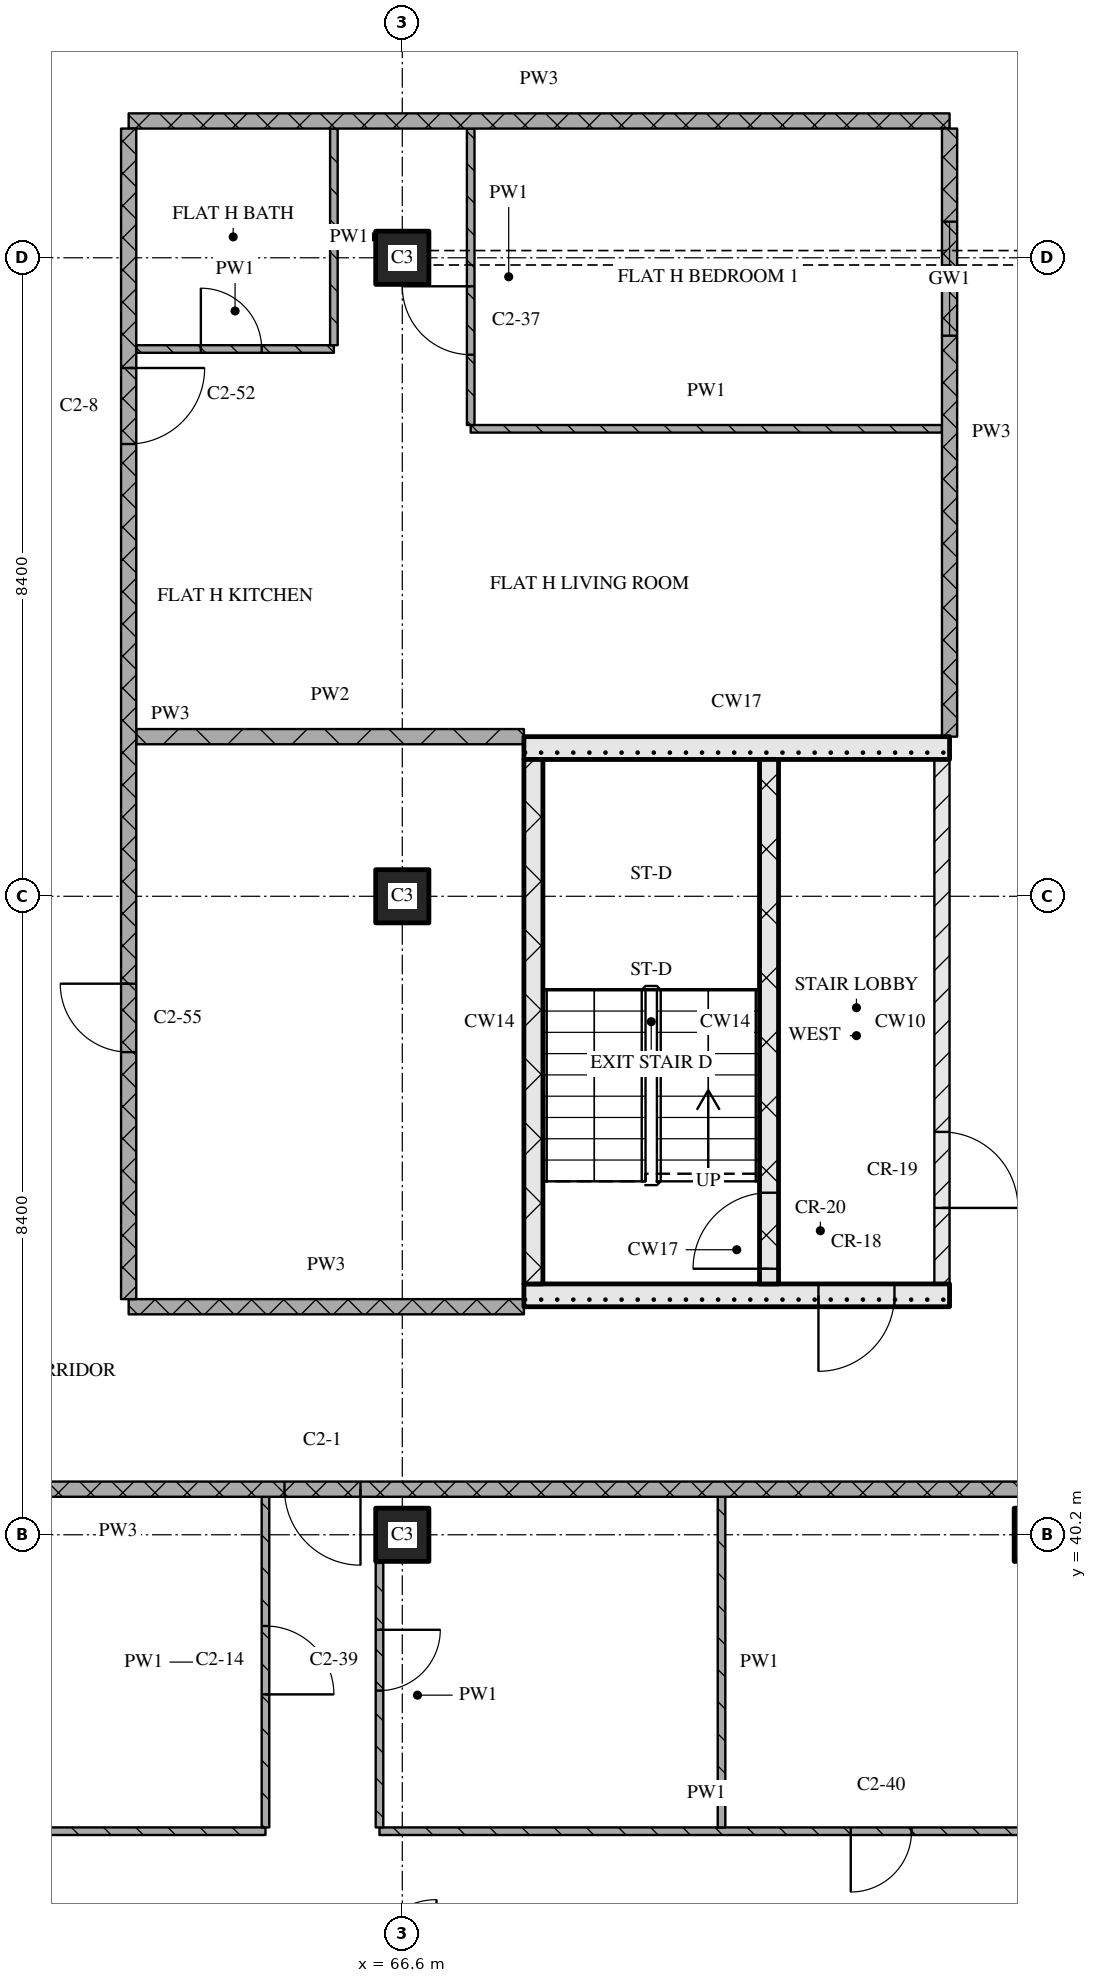
"""IFC4 building model, lengths in metres.
Left out: names, types, materials, properties, quantities, classifications, styles, units other than length and angle.
Written with IfcOpenShell. Run it as: python <this file> out.ifc"""

import sys

from ifc_helpers import new_model, si_unit, direction, frame, frame_2d, origin, origin_2d, place, context, subcontext, project, spatial, rectangle, extrude, element, fill, save


model = new_model("IFC4")
c1 = context("Model", 3, precision=1e-05, world=origin(), true_north=direction((0.0, 1.0)))
c2 = subcontext(c1, "Body", "Model", "MODEL_VIEW")
j1 = project(units=[si_unit("LENGTHUNIT", "METRE"), si_unit("PLANEANGLEUNIT", "RADIAN")], contexts=[c1])
p1 = place(None, origin())
s1 = spatial("IfcSite", under=j1, at=p1, CompositionType="ELEMENT")
p2 = place(p1, origin())
s2 = spatial("IfcBuilding", under=s1, at=p2, CompositionType="ELEMENT")
p3 = place(p2, frame((0.0, 0.0, 161.85)))
s3 = spatial("IfcBuildingStorey", under=s2, at=p3, CompositionType="ELEMENT", Elevation=161.85)
for number, where, z_axis, x_axis in (
    (1, (66.6, 40.2, 0.0), (0.0, 0.0, 1.0), (1.0, 0.0, 0.0)),
    (2, (66.6, 48.6, 0.0), (0.0, 0.0, 1.0), (1.0, 0.0, 0.0)),
    (3, (66.6, 57.0, 0.0), (0.0, 0.0, 1.0), (1.0, 0.0, 0.0)),
    (4, (75.0, 40.2, 0.0), (0.0, 0.0, 1.0), (1.0, 0.0, 0.0)),
):
    element("IfcColumn", number, at=place(p3, frame(where, z_axis=z_axis, x_axis=x_axis)), inside=s3, PredefinedType="COLUMN", context=c2, shape_type="SweptSolid", body=[
        extrude(rectangle(XDim=0.7, YDim=0.7, at=origin_2d()), origin(), (0.0, 0.0, 1.0), 3.6),
    ])
p4 = place(p3, frame((68.2, 43.35, 0.0), z_axis=(0.0, 0.0, 1.0), x_axis=(1.0, 0.0, 0.0)))
e5 = element("IfcWall", 5, at=p4, inside=s3, PredefinedType="SOLIDWALL", context=c2, shape_type="SweptSolid", body=[
    extrude(rectangle(XDim=5.6, YDim=0.3, at=frame_2d((2.8, 0.0))), origin(), (0.0, 0.0, 1.0), 3.32),
])
p5 = place(p4, frame((3.875, 0.0, 0.0)))
e6 = element("IfcOpeningElement", 6, at=p5, cuts=e5, PredefinedType="OPENING", context=c2, shape_type="SweptSolid", body=[
    extrude(rectangle(XDim=1.0, YDim=2.1, at=frame_2d((0.5, 1.05))), frame((0.0, 0.16, 0.0), z_axis=(0.0, -1.0, 0.0), x_axis=(1.0, 0.0, 0.0)), (0.0, 0.0, 1.0), 0.32),
])
p6 = place(p3, frame((68.325, 43.5, 0.0), z_axis=(0.0, 0.0, 1.0), x_axis=(0.0, 1.0, 0.0)))
e7 = element("IfcWall", 7, at=p6, inside=s3, PredefinedType="SOLIDWALL", context=c2, shape_type="SweptSolid", body=[
    extrude(rectangle(XDim=6.9, YDim=0.25, at=frame_2d((3.45, 0.0))), origin(), (0.0, 0.0, 1.0), 3.32),
])
p7 = place(p3, frame((71.425, 43.5, 0.0), z_axis=(0.0, 0.0, 1.0), x_axis=(0.0, 1.0, 0.0)))
e8 = element("IfcWall", 8, at=p7, inside=s3, PredefinedType="SOLIDWALL", context=c2, shape_type="SweptSolid", body=[
    extrude(rectangle(XDim=6.9, YDim=0.25, at=frame_2d((3.45, 0.0))), origin(), (0.0, 0.0, 1.0), 3.32),
])
p8 = place(p7, frame((0.2, 0.0, 0.0)))
e9 = element("IfcOpeningElement", 9, at=p8, cuts=e8, PredefinedType="OPENING", context=c2, shape_type="SweptSolid", body=[
    extrude(rectangle(XDim=1.0, YDim=2.1, at=frame_2d((0.5, 1.05))), frame((0.0, 0.135, 0.0), z_axis=(0.0, -1.0, 0.0), x_axis=(1.0, 0.0, 0.0)), (0.0, 0.0, 1.0), 0.27),
])
p9 = place(p3, frame((73.7, 43.5, 0.0), z_axis=(0.0, 0.0, 1.0), x_axis=(0.0, 1.0, 0.0)))
e10 = element("IfcWall", 10, at=p9, inside=s3, PredefinedType="PARTITIONING", context=c2, shape_type="SweptSolid", body=[
    extrude(rectangle(XDim=6.9, YDim=0.2, at=frame_2d((3.45, 0.0))), origin(), (0.0, 0.0, 1.0), 3.32),
])
p10 = place(p9, frame((1.0, 0.0, 0.0)))
e11 = element("IfcOpeningElement", 11, at=p10, cuts=e10, PredefinedType="OPENING", context=c2, shape_type="SweptSolid", body=[
    extrude(rectangle(XDim=1.0, YDim=2.1, at=frame_2d((0.5, 1.05))), frame((0.0, 0.11, 0.0), z_axis=(0.0, -1.0, 0.0), x_axis=(1.0, 0.0, 0.0)), (0.0, 0.0, 1.0), 0.22),
])
p11 = place(p3, frame((68.2, 50.55, 0.0), z_axis=(0.0, 0.0, 1.0), x_axis=(1.0, 0.0, 0.0)))
e12 = element("IfcWall", 12, at=p11, inside=s3, PredefinedType="SOLIDWALL", context=c2, shape_type="SweptSolid", body=[
    extrude(rectangle(XDim=5.6, YDim=0.3, at=frame_2d((2.8, 0.0))), origin(), (0.0, 0.0, 1.0), 3.32),
])
p12 = place(p3, frame((55.5, 36.3, 0.0), z_axis=(0.0, 0.0, 1.0), x_axis=(1.0, 0.0, 0.0)))
e13 = element("IfcWall", 13, at=p12, inside=s3, PredefinedType="PARTITIONING", context=c2, shape_type="SweptSolid", body=[
    extrude(rectangle(XDim=9.3, YDim=0.1, at=frame_2d((4.65, 0.0))), origin(), (0.0, 0.0, 1.0), 3.32),
])
p13 = place(p3, frame((66.3, 36.3, 0.0), z_axis=(0.0, 0.0, 1.0), x_axis=(1.0, 0.0, 0.0)))
e14 = element("IfcWall", 14, at=p13, inside=s3, PredefinedType="PARTITIONING", context=c2, shape_type="SweptSolid", body=[
    extrude(rectangle(XDim=8.6, YDim=0.1, at=frame_2d((4.3, 0.0))), origin(), (0.0, 0.0, 1.0), 3.32),
])
p14 = place(p13, frame((6.2, 0.0, 0.0)))
e15 = element("IfcOpeningElement", 15, at=p14, cuts=e14, PredefinedType="OPENING", context=c2, shape_type="SweptSolid", body=[
    extrude(rectangle(XDim=0.8, YDim=2.1, at=frame_2d((0.4, 1.05))), frame((0.0, 0.06, 0.0), z_axis=(0.0, -1.0, 0.0), x_axis=(1.0, 0.0, 0.0)), (0.0, 0.0, 1.0), 0.12),
])
p15 = place(p3, frame((75.0, 40.8, 0.0), z_axis=(0.0, 0.0, 1.0), x_axis=(-1.0, 0.0, 0.0)))
e16 = element("IfcWall", 16, at=p15, inside=s3, PredefinedType="PARTITIONING", context=c2, shape_type="SweptSolid", body=[
    extrude(rectangle(XDim=24.28, YDim=0.2, at=frame_2d((12.14, 0.0))), origin(), (0.0, 0.0, 1.0), 3.32),
])
p16 = place(p15, frame((8.95, 0.0, 0.0)))
e17 = element("IfcOpeningElement", 17, at=p16, cuts=e16, PredefinedType="OPENING", context=c2, shape_type="SweptSolid", body=[
    extrude(rectangle(XDim=1.0, YDim=2.1, at=frame_2d((0.5, 1.05))), frame((0.0, 0.11, 0.0), z_axis=(0.0, -1.0, 0.0), x_axis=(1.0, 0.0, 0.0)), (0.0, 0.0, 1.0), 0.22),
])
p17 = place(p3, frame((63.0, 43.2, 0.0), z_axis=(0.0, 0.0, 1.0), x_axis=(1.0, 0.0, 0.0)))
e18 = element("IfcWall", 18, at=p17, inside=s3, PredefinedType="PARTITIONING", context=c2, shape_type="SweptSolid", body=[
    extrude(rectangle(XDim=5.2, YDim=0.2, at=frame_2d((2.6, 0.0))), origin(), (0.0, 0.0, 1.0), 3.32),
])
p18 = place(p3, frame((63.1, 50.7, 0.0), z_axis=(0.0, 0.0, 1.0), x_axis=(1.0, 0.0, 0.0)))
e19 = element("IfcWall", 19, at=p18, inside=s3, PredefinedType="PARTITIONING", context=c2, shape_type="SweptSolid", body=[
    extrude(rectangle(XDim=5.1, YDim=0.2, at=frame_2d((2.55, 0.0))), origin(), (0.0, 0.0, 1.0), 3.32),
])
p19 = place(p3, frame((67.5, 54.75, 0.0), z_axis=(0.0, 0.0, 1.0), x_axis=(1.0, 0.0, 0.0)))
e20 = element("IfcWall", 20, at=p19, inside=s3, PredefinedType="PARTITIONING", context=c2, shape_type="SweptSolid", body=[
    extrude(rectangle(XDim=6.2, YDim=0.1, at=frame_2d((3.1, 0.0))), origin(), (0.0, 0.0, 1.0), 3.32),
])
p20 = place(p3, frame((63.1, 55.8, 0.0), z_axis=(0.0, 0.0, 1.0), x_axis=(1.0, 0.0, 0.0)))
e21 = element("IfcWall", 21, at=p20, inside=s3, PredefinedType="PARTITIONING", context=c2, shape_type="SweptSolid", body=[
    extrude(rectangle(XDim=2.6, YDim=0.1, at=frame_2d((1.3, 0.0))), origin(), (0.0, 0.0, 1.0), 3.32),
])
p21 = place(p20, frame((0.85, 0.0, 0.0)))
e22 = element("IfcOpeningElement", 22, at=p21, cuts=e21, PredefinedType="OPENING", context=c2, shape_type="SweptSolid", body=[
    extrude(rectangle(XDim=0.8, YDim=2.1, at=frame_2d((0.4, 1.05))), frame((0.0, 0.06, 0.0), z_axis=(0.0, -1.0, 0.0), x_axis=(1.0, 0.0, 0.0)), (0.0, 0.0, 1.0), 0.12),
])
p22 = place(p3, frame((63.0, 58.8, 0.0), z_axis=(0.0, 0.0, 1.0), x_axis=(1.0, 0.0, 0.0)))
e23 = element("IfcWall", 23, at=p22, inside=s3, PredefinedType="PARTITIONING", context=c2, shape_type="SweptSolid", body=[
    extrude(rectangle(XDim=10.8, YDim=0.2, at=frame_2d((5.4, 0.0))), origin(), (0.0, 0.0, 1.0), 3.32),
])
p23 = place(p3, frame((63.0, 58.7, 0.0), z_axis=(0.0, 0.0, 1.0), x_axis=(0.0, -1.0, 0.0)))
e24 = element("IfcWall", 24, at=p23, inside=s3, PredefinedType="PARTITIONING", context=c2, shape_type="SweptSolid", body=[
    extrude(rectangle(XDim=15.4, YDim=0.2, at=frame_2d((7.7, 0.0))), origin(), (0.0, 0.0, 1.0), 3.32),
])
p24 = place(p23, frame((3.15, 0.0, 0.0)))
e25 = element("IfcOpeningElement", 25, at=p24, cuts=e24, PredefinedType="OPENING", context=c2, shape_type="SweptSolid", body=[
    extrude(rectangle(XDim=1.0, YDim=2.1, at=frame_2d((0.5, 1.05))), frame((0.0, 0.11, 0.0), z_axis=(0.0, -1.0, 0.0), x_axis=(1.0, 0.0, 0.0)), (0.0, 0.0, 1.0), 0.22),
])
p25 = place(p23, frame((11.25, 0.0, 0.0)))
e26 = element("IfcOpeningElement", 26, at=p25, cuts=e24, PredefinedType="OPENING", context=c2, shape_type="SweptSolid", body=[
    extrude(rectangle(XDim=0.9, YDim=2.1, at=frame_2d((0.45, 1.05))), frame((0.0, 0.11, 0.0), z_axis=(0.0, -1.0, 0.0), x_axis=(1.0, 0.0, 0.0)), (0.0, 0.0, 1.0), 0.22),
])
p26 = place(p3, frame((64.8, 36.35, 0.0), z_axis=(0.0, 0.0, 1.0), x_axis=(0.0, 1.0, 0.0)))
e27 = element("IfcWall", 27, at=p26, inside=s3, PredefinedType="PARTITIONING", context=c2, shape_type="SweptSolid", body=[
    extrude(rectangle(XDim=4.35, YDim=0.1, at=frame_2d((2.175, 0.0))), origin(), (0.0, 0.0, 1.0), 3.32),
])
p27 = place(p26, frame((1.75, 0.0, 0.0)))
e28 = element("IfcOpeningElement", 28, at=p27, cuts=e27, PredefinedType="OPENING", context=c2, shape_type="SweptSolid", body=[
    extrude(rectangle(XDim=0.9, YDim=2.1, at=frame_2d((0.45, 1.05))), frame((0.0, 0.06, 0.0), z_axis=(0.0, -1.0, 0.0), x_axis=(1.0, 0.0, 0.0)), (0.0, 0.0, 1.0), 0.12),
])
p28 = place(p3, frame((65.7, 58.7, 0.0), z_axis=(0.0, 0.0, 1.0), x_axis=(0.0, -1.0, 0.0)))
e29 = element("IfcWall", 29, at=p28, inside=s3, PredefinedType="PARTITIONING", context=c2, shape_type="SweptSolid", body=[
    extrude(rectangle(XDim=2.85, YDim=0.1, at=frame_2d((1.425, 0.0))), origin(), (0.0, 0.0, 1.0), 3.32),
])
p29 = place(p3, frame((66.3, 39.83, 0.0), z_axis=(0.0, 0.0, 1.0), x_axis=(0.0, -1.0, 0.0)))
e30 = element("IfcWall", 30, at=p29, inside=s3, PredefinedType="PARTITIONING", context=c2, shape_type="SweptSolid", body=[
    extrude(rectangle(XDim=3.48, YDim=0.1, at=frame_2d((1.74, 0.0))), origin(), (0.0, 0.0, 1.0), 3.32),
])
p30 = place(p29, frame((0.88, 0.0, 0.0)))
e31 = element("IfcOpeningElement", 31, at=p30, cuts=e30, PredefinedType="OPENING", context=c2, shape_type="SweptSolid", body=[
    extrude(rectangle(XDim=0.8, YDim=2.1, at=frame_2d((0.4, 1.05))), frame((0.0, 0.06, 0.0), z_axis=(0.0, -1.0, 0.0), x_axis=(1.0, 0.0, 0.0)), (0.0, 0.0, 1.0), 0.12),
])
p31 = place(p3, frame((67.5, 58.7, 0.0), z_axis=(0.0, 0.0, 1.0), x_axis=(0.0, -1.0, 0.0)))
e32 = element("IfcWall", 32, at=p31, inside=s3, PredefinedType="PARTITIONING", context=c2, shape_type="SweptSolid", body=[
    extrude(rectangle(XDim=3.9, YDim=0.1, at=frame_2d((1.95, 0.0))), origin(), (0.0, 0.0, 1.0), 3.32),
])
p32 = place(p31, frame((2.075, 0.0, 0.0)))
e33 = element("IfcOpeningElement", 33, at=p32, cuts=e32, PredefinedType="OPENING", context=c2, shape_type="SweptSolid", body=[
    extrude(rectangle(XDim=0.9, YDim=2.1, at=frame_2d((0.45, 1.05))), frame((0.0, 0.06, 0.0), z_axis=(0.0, -1.0, 0.0), x_axis=(1.0, 0.0, 0.0)), (0.0, 0.0, 1.0), 0.12),
])
p33 = place(p3, frame((70.8, 40.7, 0.0), z_axis=(0.0, 0.0, 1.0), x_axis=(0.0, -1.0, 0.0)))
e34 = element("IfcWall", 34, at=p33, inside=s3, PredefinedType="PARTITIONING", context=c2, shape_type="SweptSolid", body=[
    extrude(rectangle(XDim=4.35, YDim=0.1, at=frame_2d((2.175, 0.0))), origin(), (0.0, 0.0, 1.0), 3.32),
])
p34 = place(p3, frame((73.8, 58.7, 0.0), z_axis=(0.0, 0.0, 1.0), x_axis=(0.0, -1.0, 0.0)))
e35 = element("IfcWall", 35, at=p34, inside=s3, PredefinedType="PARTITIONING", context=c2, shape_type="SweptSolid", body=[
    extrude(rectangle(XDim=8.0, YDim=0.2, at=frame_2d((4.0, 0.0))), origin(), (0.0, 0.0, 1.0), 3.32),
])
p35 = place(p34, frame((1.225, 0.0, 0.9)))
e36 = element("IfcOpeningElement", 36, at=p35, cuts=e35, PredefinedType="OPENING", context=c2, shape_type="SweptSolid", body=[
    extrude(rectangle(XDim=1.5, YDim=1.5, at=frame_2d((0.75, 0.75))), frame((0.0, 0.11, 0.0), z_axis=(0.0, -1.0, 0.0), x_axis=(1.0, 0.0, 0.0)), (0.0, 0.0, 1.0), 0.22),
])
p36 = place(p5, origin())
e37 = element("IfcDoor", 37, at=p36, inside=s3, OperationType="SINGLE_SWING_RIGHT", PredefinedType="DOOR", context=c2, shape_type="SweptSolid", body=[
    extrude(rectangle(XDim=1.0, YDim=2.1, at=frame_2d((0.5, 1.05))), frame((0.0, 0.025, 0.0), z_axis=(0.0, -1.0, 0.0), x_axis=(1.0, 0.0, 0.0)), (0.0, 0.0, 1.0), 0.05),
])
fill(e6, e37)
p37 = place(p8, origin())
e38 = element("IfcDoor", 38, at=p37, inside=s3, OperationType="SINGLE_SWING_LEFT", PredefinedType="DOOR", context=c2, shape_type="SweptSolid", body=[
    extrude(rectangle(XDim=1.0, YDim=2.1, at=frame_2d((0.5, 1.05))), frame((0.0, 0.025, 0.0), z_axis=(0.0, -1.0, 0.0), x_axis=(1.0, 0.0, 0.0)), (0.0, 0.0, 1.0), 0.05),
])
fill(e9, e38)
p38 = place(p10, origin())
e39 = element("IfcDoor", 39, at=p38, inside=s3, OperationType="SINGLE_SWING_RIGHT", PredefinedType="DOOR", context=c2, shape_type="SweptSolid", body=[
    extrude(rectangle(XDim=1.0, YDim=2.1, at=frame_2d((0.5, 1.05))), frame((0.0, 0.025, 0.0), z_axis=(0.0, -1.0, 0.0), x_axis=(1.0, 0.0, 0.0)), (0.0, 0.0, 1.0), 0.05),
])
fill(e11, e39)
p39 = place(p14, origin())
e40 = element("IfcDoor", 40, at=p39, inside=s3, OperationType="SINGLE_SWING_RIGHT", PredefinedType="DOOR", context=c2, shape_type="SweptSolid", body=[
    extrude(rectangle(XDim=0.8, YDim=2.1, at=frame_2d((0.4, 1.05))), frame((0.0, 0.025, 0.0), z_axis=(0.0, -1.0, 0.0), x_axis=(1.0, 0.0, 0.0)), (0.0, 0.0, 1.0), 0.05),
])
fill(e15, e40)
p40 = place(p16, origin())
e41 = element("IfcDoor", 41, at=p40, inside=s3, OperationType="SINGLE_SWING_LEFT", PredefinedType="DOOR", context=c2, shape_type="SweptSolid", body=[
    extrude(rectangle(XDim=1.0, YDim=2.1, at=frame_2d((0.5, 1.05))), frame((0.0, 0.025, 0.0), z_axis=(0.0, -1.0, 0.0), x_axis=(1.0, 0.0, 0.0)), (0.0, 0.0, 1.0), 0.05),
])
fill(e17, e41)
p41 = place(p21, origin())
e42 = element("IfcDoor", 42, at=p41, inside=s3, OperationType="SINGLE_SWING_LEFT", PredefinedType="DOOR", context=c2, shape_type="SweptSolid", body=[
    extrude(rectangle(XDim=0.8, YDim=2.1, at=frame_2d((0.4, 1.05))), frame((0.0, 0.025, 0.0), z_axis=(0.0, -1.0, 0.0), x_axis=(1.0, 0.0, 0.0)), (0.0, 0.0, 1.0), 0.05),
])
fill(e22, e42)
p42 = place(p24, origin())
e43 = element("IfcDoor", 43, at=p42, inside=s3, OperationType="SINGLE_SWING_LEFT", PredefinedType="DOOR", context=c2, shape_type="SweptSolid", body=[
    extrude(rectangle(XDim=1.0, YDim=2.1, at=frame_2d((0.5, 1.05))), frame((0.0, 0.025, 0.0), z_axis=(0.0, -1.0, 0.0), x_axis=(1.0, 0.0, 0.0)), (0.0, 0.0, 1.0), 0.05),
])
fill(e25, e43)
p43 = place(p25, origin())
e44 = element("IfcDoor", 44, at=p43, inside=s3, OperationType="SINGLE_SWING_RIGHT", PredefinedType="DOOR", context=c2, shape_type="SweptSolid", body=[
    extrude(rectangle(XDim=0.9, YDim=2.1, at=frame_2d((0.45, 1.05))), frame((0.0, 0.025, 0.0), z_axis=(0.0, -1.0, 0.0), x_axis=(1.0, 0.0, 0.0)), (0.0, 0.0, 1.0), 0.05),
])
fill(e26, e44)
p44 = place(p27, origin())
e45 = element("IfcDoor", 45, at=p44, inside=s3, OperationType="SINGLE_SWING_RIGHT", PredefinedType="DOOR", context=c2, shape_type="SweptSolid", body=[
    extrude(rectangle(XDim=0.9, YDim=2.1, at=frame_2d((0.45, 1.05))), frame((0.0, 0.025, 0.0), z_axis=(0.0, -1.0, 0.0), x_axis=(1.0, 0.0, 0.0)), (0.0, 0.0, 1.0), 0.05),
])
fill(e28, e45)
p45 = place(p30, origin())
e46 = element("IfcDoor", 46, at=p45, inside=s3, OperationType="SINGLE_SWING_LEFT", PredefinedType="DOOR", context=c2, shape_type="SweptSolid", body=[
    extrude(rectangle(XDim=0.8, YDim=2.1, at=frame_2d((0.4, 1.05))), frame((0.0, 0.025, 0.0), z_axis=(0.0, -1.0, 0.0), x_axis=(1.0, 0.0, 0.0)), (0.0, 0.0, 1.0), 0.05),
])
fill(e31, e46)
p46 = place(p32, origin())
e47 = element("IfcDoor", 47, at=p46, inside=s3, OperationType="SINGLE_SWING_RIGHT", PredefinedType="DOOR", context=c2, shape_type="SweptSolid", body=[
    extrude(rectangle(XDim=0.9, YDim=2.1, at=frame_2d((0.45, 1.05))), frame((0.0, 0.025, 0.0), z_axis=(0.0, -1.0, 0.0), x_axis=(1.0, 0.0, 0.0)), (0.0, 0.0, 1.0), 0.05),
])
fill(e33, e47)
p47 = place(p35, origin())
e48 = element("IfcWindow", 48, at=p47, inside=s3, PartitioningType="SINGLE_PANEL", PredefinedType="WINDOW", context=c2, shape_type="SweptSolid", body=[
    extrude(rectangle(XDim=1.5, YDim=1.5, at=frame_2d((0.75, 0.75))), frame((0.0, 0.03, 0.0), z_axis=(0.0, -1.0, 0.0), x_axis=(1.0, 0.0, 0.0)), (0.0, 0.0, 1.0), 0.06),
])
fill(e36, e48)
save(model, sys.argv[1])
